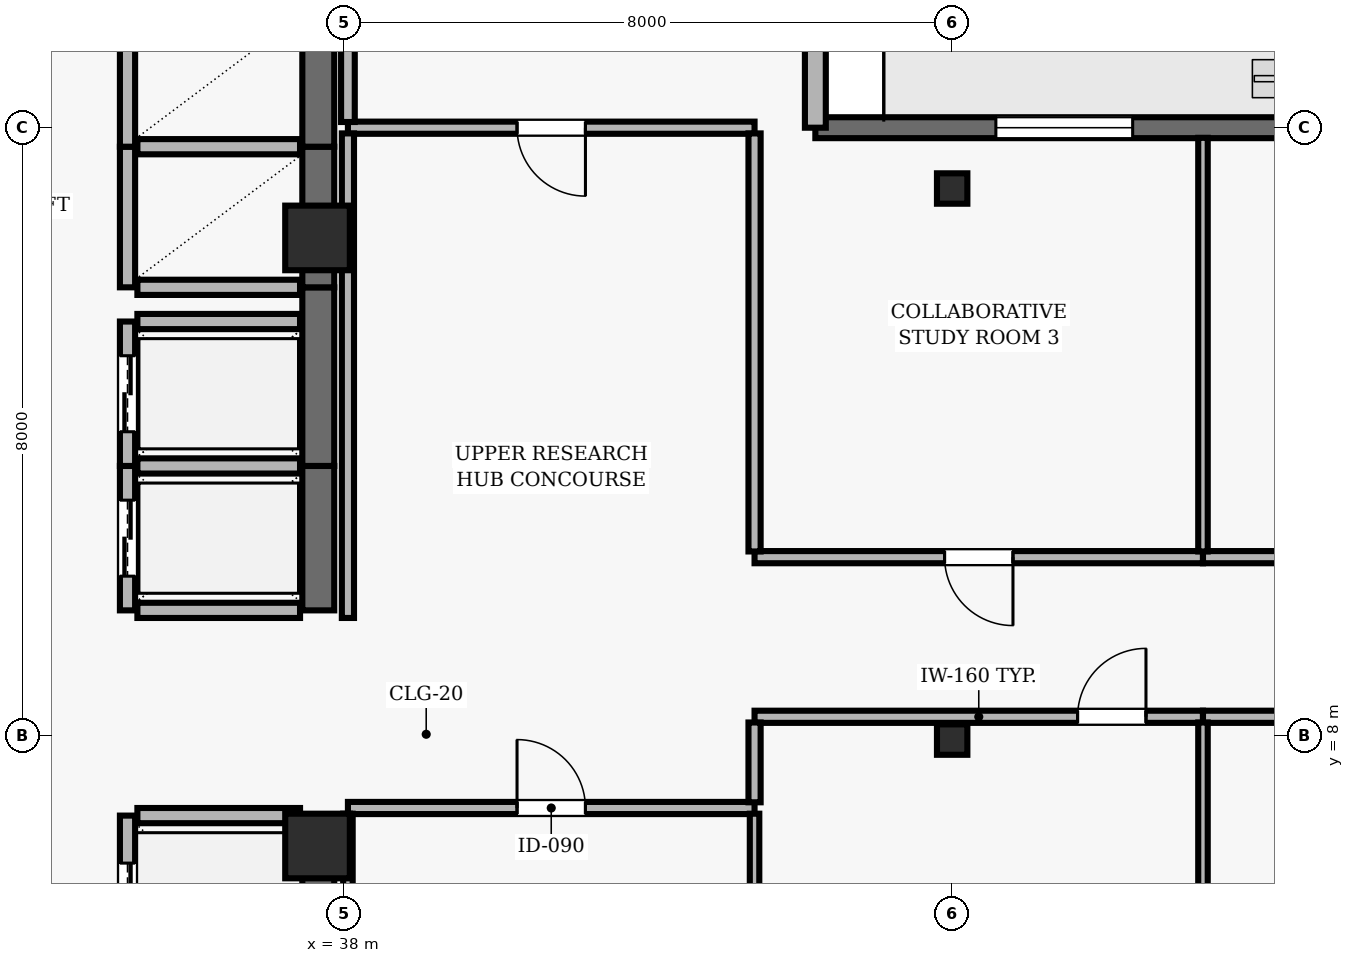
"""IFC4 building model, lengths in metres.
Left out: names, types, materials, properties, quantities, classifications, styles, units other than length and angle.
Written with IfcOpenShell. Run it as: python <this file> out.ifc"""

import sys

from ifc_helpers import new_model, si_unit, direction, frame, frame_2d, origin, origin_2d, place, context, subcontext, project, spatial, rectangle, hollow_rectangle, extrude, element, fill, save


model = new_model("IFC4")
c1 = context("Model", 3, precision=1e-05, world=origin(), true_north=direction((0.0, 1.0)))
c2 = subcontext(c1, "Body", "Model", "MODEL_VIEW")
j1 = project(units=[si_unit("LENGTHUNIT", "METRE"), si_unit("PLANEANGLEUNIT", "RADIAN")], contexts=[c1])
p1 = place(None, origin())
s1 = spatial("IfcSite", under=j1, at=p1, CompositionType="ELEMENT")
p2 = place(p1, origin())
s2 = spatial("IfcBuilding", under=s1, at=p2, CompositionType="ELEMENT")
p3 = place(p2, frame((0.0, 0.0, 287.2)))
s3 = spatial("IfcBuildingStorey", under=s2, at=p3, CompositionType="ELEMENT", Elevation=287.2)
for number, where, z_axis, x_axis in (
    (1, (37.65, 6.55, 0.0), (0.0, 0.0, 1.0), (1.0, 0.0, 0.0)),
    (2, (37.65, 14.55, 0.0), (0.0, 0.0, 1.0), (1.0, 0.0, 0.0)),
):
    element("IfcColumn", number, at=place(p3, frame(where, z_axis=z_axis, x_axis=x_axis)), inside=s3, PredefinedType="COLUMN", context=c2, shape_type="SweptSolid", body=[
        extrude(rectangle(XDim=0.85, YDim=0.85, at=origin_2d()), origin(), (0.0, 0.0, 1.0), 3.9),
    ])
for number, where, z_axis, x_axis in (
    (3, (46.0, 7.95, 0.0), (0.0, 0.0, 1.0), (1.0, 0.0, 0.0)),
    (4, (46.0, 15.2, 0.0), (0.0, 0.0, 1.0), (1.0, 0.0, 0.0)),
):
    element("IfcColumn", number, at=place(p3, frame(where, z_axis=z_axis, x_axis=x_axis)), inside=s3, PredefinedType="COLUMN", context=c2, shape_type="SweptSolid", body=[
        extrude(hollow_rectangle(XDim=0.4, YDim=0.4, WallThickness=0.02, at=origin_2d()), origin(), (0.0, 0.0, 1.0), 3.9),
    ])
p4 = place(p3, frame((57.3, 16.0, 0.0), z_axis=(0.0, 0.0, 1.0), x_axis=(-1.0, 0.0, 0.0)))
e5 = element("IfcWall", 5, at=p4, inside=s3, PredefinedType="SOLIDWALL", context=c2, shape_type="SweptSolid", body=[
    extrude(rectangle(XDim=13.1, YDim=0.275, at=frame_2d((6.55, 0.0))), origin(), (0.0, 0.0, 1.0), 3.69),
])
p5 = place(p4, frame((1.15, 0.0, 0.0)))
e6 = element("IfcOpeningElement", 6, at=p5, cuts=e5, PredefinedType="OPENING", context=c2, shape_type="SweptSolid", body=[
    extrude(rectangle(XDim=1.0, YDim=2.2, at=frame_2d((0.5, 1.1))), frame((0.0, 0.147, 0.0), z_axis=(0.0, -1.0, 0.0), x_axis=(1.0, 0.0, 0.0)), (0.0, 0.0, 1.0), 0.295),
])
p6 = place(p4, frame((3.275, 0.0, 0.9)))
e7 = element("IfcOpeningElement", 7, at=p6, cuts=e5, PredefinedType="OPENING", context=c2, shape_type="SweptSolid", body=[
    extrude(rectangle(XDim=1.8, YDim=1.6, at=frame_2d((0.9, 0.8))), frame((0.0, 0.147, 0.0), z_axis=(0.0, -1.0, 0.0), x_axis=(1.0, 0.0, 0.0)), (0.0, 0.0, 1.0), 0.295),
])
p7 = place(p4, frame((8.925, 0.0, 0.9)))
e8 = element("IfcOpeningElement", 8, at=p7, cuts=e5, PredefinedType="OPENING", context=c2, shape_type="SweptSolid", body=[
    extrude(rectangle(XDim=1.8, YDim=1.6, at=frame_2d((0.9, 0.8))), frame((0.0, 0.147, 0.0), z_axis=(0.0, -1.0, 0.0), x_axis=(1.0, 0.0, 0.0)), (0.0, 0.0, 1.0), 0.295),
])
p8 = place(p3, frame((44.2, 16.0, 0.0), z_axis=(0.0, 0.0, 1.0), x_axis=(0.0, 1.0, 0.0)))
e9 = element("IfcWall", 9, at=p8, inside=s3, PredefinedType="SOLIDWALL", context=c2, shape_type="SweptSolid", body=[
    extrude(rectangle(XDim=4.4, YDim=0.275, at=frame_2d((2.2, 0.0))), origin(), (0.0, 0.0, 1.0), 3.69),
])
p9 = place(p3, frame((35.15, 6.95, 0.0), z_axis=(0.0, 0.0, 1.0), x_axis=(0.0, -1.0, 0.0)))
e10 = element("IfcWall", 10, at=p9, inside=s3, PredefinedType="SOLIDWALL", context=c2, shape_type="SweptSolid", body=[
    extrude(rectangle(XDim=2.25, YDim=0.2, at=frame_2d((1.125, 0.0))), origin(), (0.0, 0.0, 1.0), 3.69),
])
p10 = place(p9, frame((0.625, 0.0, 0.0)))
e11 = element("IfcOpeningElement", 11, at=p10, cuts=e10, PredefinedType="OPENING", context=c2, shape_type="SweptSolid", body=[
    extrude(rectangle(XDim=1.0, YDim=2.1, at=frame_2d((0.5, 1.05))), frame((0.0, 0.11, 0.0), z_axis=(0.0, -1.0, 0.0), x_axis=(1.0, 0.0, 0.0)), (0.0, 0.0, 1.0), 0.22),
])
p11 = place(p3, frame((37.66, 4.7, 0.0), z_axis=(0.0, 0.0, 1.0), x_axis=(0.0, 1.0, 0.0)))
e12 = element("IfcWall", 12, at=p11, inside=s3, PredefinedType="SHEAR", context=c2, shape_type="SweptSolid", body=[
    extrude(rectangle(XDim=2.25, YDim=0.42, at=frame_2d((1.125, 0.0))), origin(), (0.0, 0.0, 1.0), 3.69),
])
p12 = place(p3, frame((37.42, 6.95, 0.0), z_axis=(0.0, 0.0, 1.0), x_axis=(-1.0, 0.0, 0.0)))
e13 = element("IfcWall", 13, at=p12, inside=s3, PredefinedType="SOLIDWALL", context=c2, shape_type="SweptSolid", body=[
    extrude(rectangle(XDim=2.14, YDim=0.2, at=frame_2d((1.07, 0.0))), origin(), (0.0, 0.0, 1.0), 3.69),
])
p13 = place(p3, frame((35.15, 11.55, 0.0), z_axis=(0.0, 0.0, 1.0), x_axis=(0.0, -1.0, 0.0)))
e14 = element("IfcWall", 14, at=p13, inside=s3, PredefinedType="SOLIDWALL", context=c2, shape_type="SweptSolid", body=[
    extrude(rectangle(XDim=1.9, YDim=0.2, at=frame_2d((0.95, 0.0))), origin(), (0.0, 0.0, 1.0), 3.69),
])
p14 = place(p13, frame((0.45, 0.0, 0.0)))
e15 = element("IfcOpeningElement", 15, at=p14, cuts=e14, PredefinedType="OPENING", context=c2, shape_type="SweptSolid", body=[
    extrude(rectangle(XDim=1.0, YDim=2.1, at=frame_2d((0.5, 1.05))), frame((0.0, 0.11, 0.0), z_axis=(0.0, -1.0, 0.0), x_axis=(1.0, 0.0, 0.0)), (0.0, 0.0, 1.0), 0.22),
])
p15 = place(p3, frame((37.66, 9.65, 0.0), z_axis=(0.0, 0.0, 1.0), x_axis=(0.0, 1.0, 0.0)))
e16 = element("IfcWall", 16, at=p15, inside=s3, PredefinedType="SHEAR", context=c2, shape_type="SweptSolid", body=[
    extrude(rectangle(XDim=1.9, YDim=0.42, at=frame_2d((0.95, 0.0))), origin(), (0.0, 0.0, 1.0), 3.69),
])
for number, where, z_axis, x_axis in (
    (17, (35.28, 9.65, 0.0), (0.0, 0.0, 1.0), (1.0, 0.0, 0.0)),
    (18, (37.42, 11.55, 0.0), (0.0, 0.0, 1.0), (-1.0, 0.0, 0.0)),
):
    element("IfcWall", number, at=place(p3, frame(where, z_axis=z_axis, x_axis=x_axis)), inside=s3, PredefinedType="SOLIDWALL", context=c2, shape_type="SweptSolid", body=[
        extrude(rectangle(XDim=2.14, YDim=0.2, at=frame_2d((1.07, 0.0))), origin(), (0.0, 0.0, 1.0), 3.69),
    ])
p16 = place(p3, frame((35.15, 13.45, 0.0), z_axis=(0.0, 0.0, 1.0), x_axis=(0.0, -1.0, 0.0)))
e19 = element("IfcWall", 19, at=p16, inside=s3, PredefinedType="SOLIDWALL", context=c2, shape_type="SweptSolid", body=[
    extrude(rectangle(XDim=1.9, YDim=0.2, at=frame_2d((0.95, 0.0))), origin(), (0.0, 0.0, 1.0), 3.69),
])
p17 = place(p16, frame((0.45, 0.0, 0.0)))
e20 = element("IfcOpeningElement", 20, at=p17, cuts=e19, PredefinedType="OPENING", context=c2, shape_type="SweptSolid", body=[
    extrude(rectangle(XDim=1.0, YDim=2.1, at=frame_2d((0.5, 1.05))), frame((0.0, 0.11, 0.0), z_axis=(0.0, -1.0, 0.0), x_axis=(1.0, 0.0, 0.0)), (0.0, 0.0, 1.0), 0.22),
])
p18 = place(p3, frame((37.66, 11.55, 0.0), z_axis=(0.0, 0.0, 1.0), x_axis=(0.0, 1.0, 0.0)))
e21 = element("IfcWall", 21, at=p18, inside=s3, PredefinedType="SHEAR", context=c2, shape_type="SweptSolid", body=[
    extrude(rectangle(XDim=2.35, YDim=0.42, at=frame_2d((1.175, 0.0))), origin(), (0.0, 0.0, 1.0), 3.69),
])
p19 = place(p3, frame((37.42, 13.45, 0.0), z_axis=(0.0, 0.0, 1.0), x_axis=(-1.0, 0.0, 0.0)))
e22 = element("IfcWall", 22, at=p19, inside=s3, PredefinedType="SOLIDWALL", context=c2, shape_type="SweptSolid", body=[
    extrude(rectangle(XDim=2.14, YDim=0.2, at=frame_2d((1.07, 0.0))), origin(), (0.0, 0.0, 1.0), 3.69),
])
p20 = place(p3, frame((35.15, 15.75, 0.0), z_axis=(0.0, 0.0, 1.0), x_axis=(0.0, -1.0, 0.0)))
e23 = element("IfcWall", 23, at=p20, inside=s3, PredefinedType="SOLIDWALL", context=c2, shape_type="SweptSolid", body=[
    extrude(rectangle(XDim=1.85, YDim=0.2, at=frame_2d((0.925, 0.0))), origin(), (0.0, 0.0, 1.0), 3.69),
])
p21 = place(p3, frame((37.66, 13.9, 0.0), z_axis=(0.0, 0.0, 1.0), x_axis=(0.0, 1.0, 0.0)))
e24 = element("IfcWall", 24, at=p21, inside=s3, PredefinedType="SHEAR", context=c2, shape_type="SweptSolid", body=[
    extrude(rectangle(XDim=1.85, YDim=0.42, at=frame_2d((0.925, 0.0))), origin(), (0.0, 0.0, 1.0), 3.69),
])
for number, where, z_axis, x_axis in (
    (25, (35.28, 13.9, 0.0), (0.0, 0.0, 1.0), (1.0, 0.0, 0.0)),
    (26, (37.42, 15.75, 0.0), (0.0, 0.0, 1.0), (-1.0, 0.0, 0.0)),
):
    element("IfcWall", number, at=place(p3, frame(where, z_axis=z_axis, x_axis=x_axis)), inside=s3, PredefinedType="SOLIDWALL", context=c2, shape_type="SweptSolid", body=[
        extrude(rectangle(XDim=2.14, YDim=0.2, at=frame_2d((1.07, 0.0))), origin(), (0.0, 0.0, 1.0), 3.69),
    ])
p22 = place(p3, frame((35.15, 17.6, 0.0), z_axis=(0.0, 0.0, 1.0), x_axis=(0.0, -1.0, 0.0)))
e27 = element("IfcWall", 27, at=p22, inside=s3, PredefinedType="SOLIDWALL", context=c2, shape_type="SweptSolid", body=[
    extrude(rectangle(XDim=1.85, YDim=0.2, at=frame_2d((0.925, 0.0))), origin(), (0.0, 0.0, 1.0), 3.69),
])
p23 = place(p3, frame((37.66, 15.75, 0.0), z_axis=(0.0, 0.0, 1.0), x_axis=(0.0, 1.0, 0.0)))
e28 = element("IfcWall", 28, at=p23, inside=s3, PredefinedType="SHEAR", context=c2, shape_type="SweptSolid", body=[
    extrude(rectangle(XDim=1.85, YDim=0.42, at=frame_2d((0.925, 0.0))), origin(), (0.0, 0.0, 1.0), 3.69),
])
p24 = place(p3, frame((38.05, 7.05, 0.0), z_axis=(0.0, 0.0, 1.0), x_axis=(1.0, 0.0, 0.0)))
e29 = element("IfcWall", 29, at=p24, inside=s3, PredefinedType="PARTITIONING", context=c2, shape_type="SweptSolid", body=[
    extrude(rectangle(XDim=5.35, YDim=0.16, at=frame_2d((2.675, 0.0))), origin(), (0.0, 0.0, 1.0), 3.69),
])
p25 = place(p24, frame((2.225, 0.0, 0.0)))
e30 = element("IfcOpeningElement", 30, at=p25, cuts=e29, PredefinedType="OPENING", context=c2, shape_type="SweptSolid", body=[
    extrude(rectangle(XDim=0.9, YDim=2.1, at=frame_2d((0.45, 1.05))), frame((0.0, 0.09, 0.0), z_axis=(0.0, -1.0, 0.0), x_axis=(1.0, 0.0, 0.0)), (0.0, 0.0, 1.0), 0.18),
])
p26 = place(p3, frame((43.4, 8.25, 0.0), z_axis=(0.0, 0.0, 1.0), x_axis=(1.0, 0.0, 0.0)))
e31 = element("IfcWall", 31, at=p26, inside=s3, PredefinedType="PARTITIONING", context=c2, shape_type="SweptSolid", body=[
    extrude(rectangle(XDim=5.9, YDim=0.16, at=frame_2d((2.95, 0.0))), origin(), (0.0, 0.0, 1.0), 3.221),
])
p27 = place(p26, frame((4.25, 0.0, 0.0)))
e32 = element("IfcOpeningElement", 32, at=p27, cuts=e31, PredefinedType="OPENING", context=c2, shape_type="SweptSolid", body=[
    extrude(rectangle(XDim=0.9, YDim=2.1, at=frame_2d((0.45, 1.05))), frame((0.0, 0.09, 0.0), z_axis=(0.0, -1.0, 0.0), x_axis=(1.0, 0.0, 0.0)), (0.0, 0.0, 1.0), 0.18),
])
p28 = place(p3, frame((43.4, 16.0, 0.0), z_axis=(0.0, 0.0, 1.0), x_axis=(-1.0, 0.0, 0.0)))
e33 = element("IfcWall", 33, at=p28, inside=s3, PredefinedType="PARTITIONING", context=c2, shape_type="SweptSolid", body=[
    extrude(rectangle(XDim=5.35, YDim=0.16, at=frame_2d((2.675, 0.0))), origin(), (0.0, 0.0, 1.0), 3.39),
])
p29 = place(p28, frame((2.225, 0.0, 0.0)))
e34 = element("IfcOpeningElement", 34, at=p29, cuts=e33, PredefinedType="OPENING", context=c2, shape_type="SweptSolid", body=[
    extrude(rectangle(XDim=0.9, YDim=2.1, at=frame_2d((0.45, 1.05))), frame((0.0, 0.09, 0.0), z_axis=(0.0, -1.0, 0.0), x_axis=(1.0, 0.0, 0.0)), (0.0, 0.0, 1.0), 0.18),
])
p30 = place(p3, frame((49.3, 8.25, 0.0), z_axis=(0.0, 0.0, 1.0), x_axis=(1.0, 0.0, 0.0)))
e35 = element("IfcWall", 35, at=p30, inside=s3, PredefinedType="PARTITIONING", context=c2, shape_type="SweptSolid", body=[
    extrude(rectangle(XDim=5.58, YDim=0.16, at=frame_2d((2.79, 0.0))), origin(), (0.0, 0.0, 1.0), 3.221),
])
p31 = place(p30, frame((3.74, 0.0, 0.0)))
e36 = element("IfcOpeningElement", 36, at=p31, cuts=e35, PredefinedType="OPENING", context=c2, shape_type="SweptSolid", body=[
    extrude(rectangle(XDim=0.9, YDim=2.1, at=frame_2d((0.45, 1.05))), frame((0.0, 0.09, 0.0), z_axis=(0.0, -1.0, 0.0), x_axis=(1.0, 0.0, 0.0)), (0.0, 0.0, 1.0), 0.18),
])
p32 = place(p3, frame((49.3, 10.35, 0.0), z_axis=(0.0, 0.0, 1.0), x_axis=(-1.0, 0.0, 0.0)))
e37 = element("IfcWall", 37, at=p32, inside=s3, PredefinedType="PARTITIONING", context=c2, shape_type="SweptSolid", body=[
    extrude(rectangle(XDim=5.9, YDim=0.16, at=frame_2d((2.95, 0.0))), origin(), (0.0, 0.0, 1.0), 3.372),
])
p33 = place(p32, frame((2.5, 0.0, 0.0)))
e38 = element("IfcOpeningElement", 38, at=p33, cuts=e37, PredefinedType="OPENING", context=c2, shape_type="SweptSolid", body=[
    extrude(rectangle(XDim=0.9, YDim=2.1, at=frame_2d((0.45, 1.05))), frame((0.0, 0.09, 0.0), z_axis=(0.0, -1.0, 0.0), x_axis=(1.0, 0.0, 0.0)), (0.0, 0.0, 1.0), 0.18),
])
p34 = place(p3, frame((54.88, 10.35, 0.0), z_axis=(0.0, 0.0, 1.0), x_axis=(-1.0, 0.0, 0.0)))
e39 = element("IfcWall", 39, at=p34, inside=s3, PredefinedType="PARTITIONING", context=c2, shape_type="SweptSolid", body=[
    extrude(rectangle(XDim=5.58, YDim=0.16, at=frame_2d((2.79, 0.0))), origin(), (0.0, 0.0, 1.0), 3.372),
])
p35 = place(p34, frame((2.34, 0.0, 0.0)))
e40 = element("IfcOpeningElement", 40, at=p35, cuts=e39, PredefinedType="OPENING", context=c2, shape_type="SweptSolid", body=[
    extrude(rectangle(XDim=0.9, YDim=2.1, at=frame_2d((0.45, 1.05))), frame((0.0, 0.09, 0.0), z_axis=(0.0, -1.0, 0.0), x_axis=(1.0, 0.0, 0.0)), (0.0, 0.0, 1.0), 0.18),
])
p36 = place(p3, frame((38.05, 6.975, 0.0), z_axis=(0.0, 0.0, 1.0), x_axis=(0.0, -1.0, 0.0)))
e41 = element("IfcWall", 41, at=p36, inside=s3, PredefinedType="PARTITIONING", context=c2, shape_type="SweptSolid", body=[
    extrude(rectangle(XDim=6.842, YDim=0.125, at=frame_2d((3.421, 0.0))), origin(), (0.0, 0.0, 1.0), 3.221),
])
p37 = place(p3, frame((38.05, 15.925, 0.0), z_axis=(0.0, 0.0, 1.0), x_axis=(0.0, -1.0, 0.0)))
e42 = element("IfcWall", 42, at=p37, inside=s3, PredefinedType="PARTITIONING", context=c2, shape_type="SweptSolid", body=[
    extrude(rectangle(XDim=6.375, YDim=0.16, at=frame_2d((3.188, 0.0))), origin(), (0.0, 0.0, 1.0), 3.221),
])
p38 = place(p3, frame((38.05, 21.468, 0.0), z_axis=(0.0, 0.0, 1.0), x_axis=(0.0, -1.0, 0.0)))
e43 = element("IfcWall", 43, at=p38, inside=s3, PredefinedType="PARTITIONING", context=c2, shape_type="SweptSolid", body=[
    extrude(rectangle(XDim=5.393, YDim=0.18, at=frame_2d((2.697, 0.0))), origin(), (0.0, 0.0, 1.0), 3.221),
])
p39 = place(p3, frame((43.4, 0.133, 0.0), z_axis=(0.0, 0.0, 1.0), x_axis=(0.0, 1.0, 0.0)))
e44 = element("IfcWall", 44, at=p39, inside=s3, PredefinedType="PARTITIONING", context=c2, shape_type="SweptSolid", body=[
    extrude(rectangle(XDim=6.842, YDim=0.125, at=frame_2d((3.421, 0.0))), origin(), (0.0, 0.0, 1.0), 3.69),
])
p40 = place(p3, frame((43.4, 7.125, 0.0), z_axis=(0.0, 0.0, 1.0), x_axis=(0.0, 1.0, 0.0)))
e45 = element("IfcWall", 45, at=p40, inside=s3, PredefinedType="PARTITIONING", context=c2, shape_type="SweptSolid", body=[
    extrude(rectangle(XDim=1.05, YDim=0.16, at=frame_2d((0.525, 0.0))), origin(), (0.0, 0.0, 1.0), 3.69),
])
p41 = place(p3, frame((43.4, 10.425, 0.0), z_axis=(0.0, 0.0, 1.0), x_axis=(0.0, 1.0, 0.0)))
e46 = element("IfcWall", 46, at=p41, inside=s3, PredefinedType="PARTITIONING", context=c2, shape_type="SweptSolid", body=[
    extrude(rectangle(XDim=5.5, YDim=0.16, at=frame_2d((2.75, 0.0))), origin(), (0.0, 0.0, 1.0), 3.69),
])
p42 = place(p3, frame((49.3, 0.133, 0.0), z_axis=(0.0, 0.0, 1.0), x_axis=(0.0, 1.0, 0.0)))
e47 = element("IfcWall", 47, at=p42, inside=s3, PredefinedType="PARTITIONING", context=c2, shape_type="SweptSolid", body=[
    extrude(rectangle(XDim=8.042, YDim=0.125, at=frame_2d((4.021, 0.0))), origin(), (0.0, 0.0, 1.0), 3.69),
])
p43 = place(p3, frame((49.3, 10.425, 0.0), z_axis=(0.0, 0.0, 1.0), x_axis=(0.0, 1.0, 0.0)))
e48 = element("IfcWall", 48, at=p43, inside=s3, PredefinedType="PARTITIONING", context=c2, shape_type="SweptSolid", body=[
    extrude(rectangle(XDim=5.442, YDim=0.125, at=frame_2d((2.721, 0.0))), origin(), (0.0, 0.0, 1.0), 3.69),
])
p44 = place(p7, origin())
e49 = element("IfcWindow", 49, at=p44, inside=s3, PartitioningType="SINGLE_PANEL", PredefinedType="WINDOW", context=c2, shape_type="SweptSolid", body=[
    extrude(rectangle(XDim=1.8, YDim=1.6, at=frame_2d((0.9, 0.8))), frame((0.0, 0.03, 0.0), z_axis=(0.0, -1.0, 0.0), x_axis=(1.0, 0.0, 0.0)), (0.0, 0.0, 1.0), 0.06),
])
fill(e8, e49)
p45 = place(p10, origin())
e50 = element("IfcDoor", 50, at=p45, inside=s3, OperationType="DOUBLE_DOOR_SLIDING", PredefinedType="DOOR", context=c2, shape_type="SweptSolid", body=[
    extrude(rectangle(XDim=1.0, YDim=2.1, at=frame_2d((0.5, 1.05))), frame((0.0, 0.025, 0.0), z_axis=(0.0, -1.0, 0.0), x_axis=(1.0, 0.0, 0.0)), (0.0, 0.0, 1.0), 0.05),
])
fill(e11, e50)
p46 = place(p14, origin())
e51 = element("IfcDoor", 51, at=p46, inside=s3, OperationType="DOUBLE_DOOR_SLIDING", PredefinedType="DOOR", context=c2, shape_type="SweptSolid", body=[
    extrude(rectangle(XDim=1.0, YDim=2.1, at=frame_2d((0.5, 1.05))), frame((0.0, 0.025, 0.0), z_axis=(0.0, -1.0, 0.0), x_axis=(1.0, 0.0, 0.0)), (0.0, 0.0, 1.0), 0.05),
])
fill(e15, e51)
p47 = place(p17, origin())
e52 = element("IfcDoor", 52, at=p47, inside=s3, OperationType="DOUBLE_DOOR_SLIDING", PredefinedType="DOOR", context=c2, shape_type="SweptSolid", body=[
    extrude(rectangle(XDim=1.0, YDim=2.1, at=frame_2d((0.5, 1.05))), frame((0.0, 0.025, 0.0), z_axis=(0.0, -1.0, 0.0), x_axis=(1.0, 0.0, 0.0)), (0.0, 0.0, 1.0), 0.05),
])
fill(e20, e52)
p48 = place(p25, origin())
e53 = element("IfcDoor", 53, at=p48, inside=s3, OperationType="SINGLE_SWING_LEFT", PredefinedType="DOOR", context=c2, shape_type="SweptSolid", body=[
    extrude(rectangle(XDim=0.9, YDim=2.1, at=frame_2d((0.45, 1.05))), frame((0.0, 0.025, 0.0), z_axis=(0.0, -1.0, 0.0), x_axis=(1.0, 0.0, 0.0)), (0.0, 0.0, 1.0), 0.05),
])
fill(e30, e53)
p49 = place(p27, origin())
e54 = element("IfcDoor", 54, at=p49, inside=s3, OperationType="SINGLE_SWING_RIGHT", PredefinedType="DOOR", context=c2, shape_type="SweptSolid", body=[
    extrude(rectangle(XDim=0.9, YDim=2.1, at=frame_2d((0.45, 1.05))), frame((0.0, 0.025, 0.0), z_axis=(0.0, -1.0, 0.0), x_axis=(1.0, 0.0, 0.0)), (0.0, 0.0, 1.0), 0.05),
])
fill(e32, e54)
p50 = place(p33, origin())
e55 = element("IfcDoor", 55, at=p50, inside=s3, OperationType="SINGLE_SWING_LEFT", PredefinedType="DOOR", context=c2, shape_type="SweptSolid", body=[
    extrude(rectangle(XDim=0.9, YDim=2.1, at=frame_2d((0.45, 1.05))), frame((0.0, 0.025, 0.0), z_axis=(0.0, -1.0, 0.0), x_axis=(1.0, 0.0, 0.0)), (0.0, 0.0, 1.0), 0.05),
])
fill(e38, e55)
p51 = place(p29, origin())
e56 = element("IfcDoor", 56, at=p51, inside=s3, OperationType="SINGLE_SWING_LEFT", PredefinedType="DOOR", context=c2, shape_type="SweptSolid", body=[
    extrude(rectangle(XDim=0.9, YDim=2.1, at=frame_2d((0.45, 1.05))), frame((0.0, 0.025, 0.0), z_axis=(0.0, -1.0, 0.0), x_axis=(1.0, 0.0, 0.0)), (0.0, 0.0, 1.0), 0.05),
])
fill(e34, e56)
save(model, sys.argv[1])
